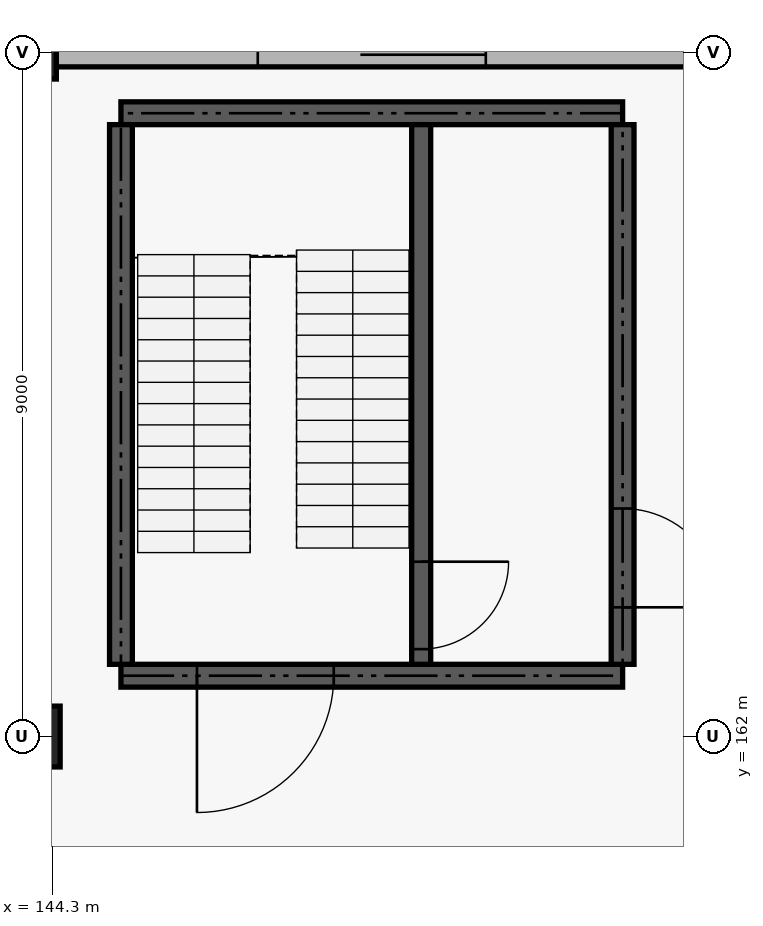
"""IFC4 building model, lengths in metres.
Left out: names, types, materials, properties, quantities, classifications, styles, units other than length and angle.
Written with IfcOpenShell. Run it as: python <this file> out.ifc"""

import sys

from ifc_helpers import new_model, si_unit, direction, frame, frame_2d, origin, origin_2d, place, context, subcontext, project, spatial, rectangle, circle, extrude, element, fill, save


model = new_model("IFC4")
c1 = context("Model", 3, precision=1e-05, world=origin(), true_north=direction((0.0, 1.0)))
c2 = subcontext(c1, "Body", "Model", "MODEL_VIEW")
j1 = project(units=[si_unit("LENGTHUNIT", "METRE"), si_unit("PLANEANGLEUNIT", "RADIAN")], contexts=[c1])
p1 = place(None, origin())
s1 = spatial("IfcSite", under=j1, at=p1, CompositionType="ELEMENT")
p2 = place(p1, origin())
s2 = spatial("IfcBuilding", under=s1, at=p2, CompositionType="ELEMENT")
p3 = place(p2, origin())
s3 = spatial("IfcBuildingStorey", under=s2, at=p3, CompositionType="ELEMENT", Elevation=0.0)
p4 = place(p3, frame((144.0, 162.0, 0.0), z_axis=(0.0, 0.0, 1.0), x_axis=(1.0, 0.0, 0.0)))
e1 = element("IfcColumn", 1, at=p4, inside=s3, PredefinedType="COLUMN", context=c2, shape_type="SweptSolid", body=[
    extrude(circle(Radius=0.4, at=origin_2d()), origin(), (0.0, 0.0, 1.0), 5.4),
])
p5 = place(p3, frame((144.0, 171.0, 0.0), z_axis=(0.0, 0.0, 1.0), x_axis=(1.0, 0.0, 0.0)))
e2 = element("IfcColumn", 2, at=p5, inside=s3, PredefinedType="COLUMN", context=c2, shape_type="SweptSolid", body=[
    extrude(rectangle(XDim=0.7, YDim=0.7, at=origin_2d()), origin(), (0.0, 0.0, 1.0), 5.4),
])
p6 = place(p3, frame((144.06, 171.0, 0.0), z_axis=(0.0, 0.0, 1.0), x_axis=(1.0, 0.0, 0.0)))
e3 = element("IfcWall", 3, at=p6, inside=s3, PredefinedType="SOLIDWALL", context=c2, shape_type="SweptSolid", body=[
    extrude(rectangle(XDim=8.88, YDim=0.38, at=frame_2d((4.44, 0.0))), origin(), (0.0, 0.0, 1.0), 4.55),
])
p7 = place(p6, frame((2.94, 0.0, 0.0)))
e4 = element("IfcOpeningElement", 4, at=p7, cuts=e3, PredefinedType="OPENING", context=c2, shape_type="SweptSolid", body=[
    extrude(rectangle(XDim=3.0, YDim=3.4, at=frame_2d((1.5, 1.7))), frame((0.0, 0.2, 0.0), z_axis=(0.0, -1.0, 0.0), x_axis=(1.0, 0.0, 0.0)), (0.0, 0.0, 1.0), 0.4),
])
p8 = place(p3, frame((145.2, 162.8, 0.0), z_axis=(0.0, 0.0, 1.0), x_axis=(1.0, 0.0, 0.0)))
e5 = element("IfcWall", 5, at=p8, inside=s3, PredefinedType="SHEAR", context=c2, shape_type="SweptSolid", body=[
    extrude(rectangle(XDim=6.6, YDim=0.3, at=frame_2d((3.3, 0.0))), origin(), (0.0, 0.0, 1.0), 5.4),
])
p9 = place(p8, frame((1.0, 0.0, 0.0)))
e6 = element("IfcOpeningElement", 6, at=p9, cuts=e5, PredefinedType="OPENING", context=c2, shape_type="SweptSolid", body=[
    extrude(rectangle(XDim=1.8, YDim=2.15, at=frame_2d((0.9, 1.075))), frame((0.0, 0.16, 0.0), z_axis=(0.0, -1.0, 0.0), x_axis=(1.0, 0.0, 0.0)), (0.0, 0.0, 1.0), 0.32),
])
p10 = place(p3, frame((145.2, 170.2, 0.0), z_axis=(0.0, 0.0, 1.0), x_axis=(1.0, 0.0, 0.0)))
e7 = element("IfcWall", 7, at=p10, inside=s3, PredefinedType="SHEAR", context=c2, shape_type="SweptSolid", body=[
    extrude(rectangle(XDim=6.6, YDim=0.3, at=frame_2d((3.3, 0.0))), origin(), (0.0, 0.0, 1.0), 5.4),
])
p11 = place(p3, frame((145.2, 162.95, 0.0), z_axis=(0.0, 0.0, 1.0), x_axis=(0.0, 1.0, 0.0)))
e8 = element("IfcWall", 8, at=p11, inside=s3, PredefinedType="SHEAR", context=c2, shape_type="SweptSolid", body=[
    extrude(rectangle(XDim=7.1, YDim=0.3, at=frame_2d((3.55, 0.0))), origin(), (0.0, 0.0, 1.0), 5.4),
])
p12 = place(p3, frame((151.8, 162.95, 0.0), z_axis=(0.0, 0.0, 1.0), x_axis=(0.0, 1.0, 0.0)))
e9 = element("IfcWall", 9, at=p12, inside=s3, PredefinedType="SHEAR", context=c2, shape_type="SweptSolid", body=[
    extrude(rectangle(XDim=7.1, YDim=0.3, at=frame_2d((3.55, 0.0))), origin(), (0.0, 0.0, 1.0), 5.4),
])
p13 = place(p12, frame((0.75, 0.0, 0.0)))
e10 = element("IfcOpeningElement", 10, at=p13, cuts=e9, PredefinedType="OPENING", context=c2, shape_type="SweptSolid", body=[
    extrude(rectangle(XDim=1.3, YDim=2.15, at=frame_2d((0.65, 1.075))), frame((0.0, 0.16, 0.0), z_axis=(0.0, -1.0, 0.0), x_axis=(1.0, 0.0, 0.0)), (0.0, 0.0, 1.0), 0.32),
])
p14 = place(p3, frame((149.15, 162.95, 0.0), z_axis=(0.0, 0.0, 1.0), x_axis=(0.0, 1.0, 0.0)))
e11 = element("IfcWall", 11, at=p14, inside=s3, PredefinedType="SHEAR", context=c2, shape_type="SweptSolid", body=[
    extrude(rectangle(XDim=7.1, YDim=0.25, at=frame_2d((3.55, 0.0))), origin(), (0.0, 0.0, 1.0), 5.4),
])
p15 = place(p14, frame((0.2, 0.0, 0.0)))
e12 = element("IfcOpeningElement", 12, at=p15, cuts=e11, PredefinedType="OPENING", context=c2, shape_type="SweptSolid", body=[
    extrude(rectangle(XDim=1.15, YDim=2.15, at=frame_2d((0.575, 1.075))), frame((0.0, 0.135, 0.0), z_axis=(0.0, -1.0, 0.0), x_axis=(1.0, 0.0, 0.0)), (0.0, 0.0, 1.0), 0.27),
])
p16 = place(p7, origin())
e13 = element("IfcDoor", 13, at=p16, inside=s3, OperationType="ROLLINGUP", PredefinedType="GATE", context=c2, shape_type="SweptSolid", body=[
    extrude(rectangle(XDim=3.0, YDim=3.4, at=frame_2d((1.5, 1.7))), frame((0.0, 0.025, 0.0), z_axis=(0.0, -1.0, 0.0), x_axis=(1.0, 0.0, 0.0)), (0.0, 0.0, 1.0), 0.05),
])
fill(e4, e13)
p17 = place(p13, frame((1.3, 0.0, 0.0), z_axis=(0.0, 0.0, 1.0), x_axis=(-1.0, 0.0, 0.0)))
e14 = element("IfcDoor", 14, at=p17, inside=s3, OperationType="DOUBLE_DOOR_SINGLE_SWING", PredefinedType="DOOR", context=c2, shape_type="SweptSolid", body=[
    extrude(rectangle(XDim=1.3, YDim=2.15, at=frame_2d((0.65, 1.075))), frame((0.0, 0.025, 0.0), z_axis=(0.0, -1.0, 0.0), x_axis=(1.0, 0.0, 0.0)), (0.0, 0.0, 1.0), 0.05),
])
fill(e10, e14)
p18 = place(p15, origin())
e15 = element("IfcDoor", 15, at=p18, inside=s3, OperationType="SINGLE_SWING_RIGHT", PredefinedType="DOOR", context=c2, shape_type="SweptSolid", body=[
    extrude(rectangle(XDim=1.15, YDim=2.15, at=frame_2d((0.575, 1.075))), frame((0.0, 0.025, 0.0), z_axis=(0.0, -1.0, 0.0), x_axis=(1.0, 0.0, 0.0)), (0.0, 0.0, 1.0), 0.05),
])
fill(e12, e15)
p19 = place(p9, frame((1.8, 0.0, 0.0), z_axis=(0.0, 0.0, 1.0), x_axis=(-1.0, 0.0, 0.0)))
e16 = element("IfcDoor", 16, at=p19, inside=s3, OperationType="DOUBLE_DOOR_SINGLE_SWING", PredefinedType="DOOR", context=c2, shape_type="SweptSolid", body=[
    extrude(rectangle(XDim=1.8, YDim=2.15, at=frame_2d((0.9, 1.075))), frame((0.0, 0.025, 0.0), z_axis=(0.0, -1.0, 0.0), x_axis=(1.0, 0.0, 0.0)), (0.0, 0.0, 1.0), 0.05),
])
fill(e6, e16)
save(model, sys.argv[1])
